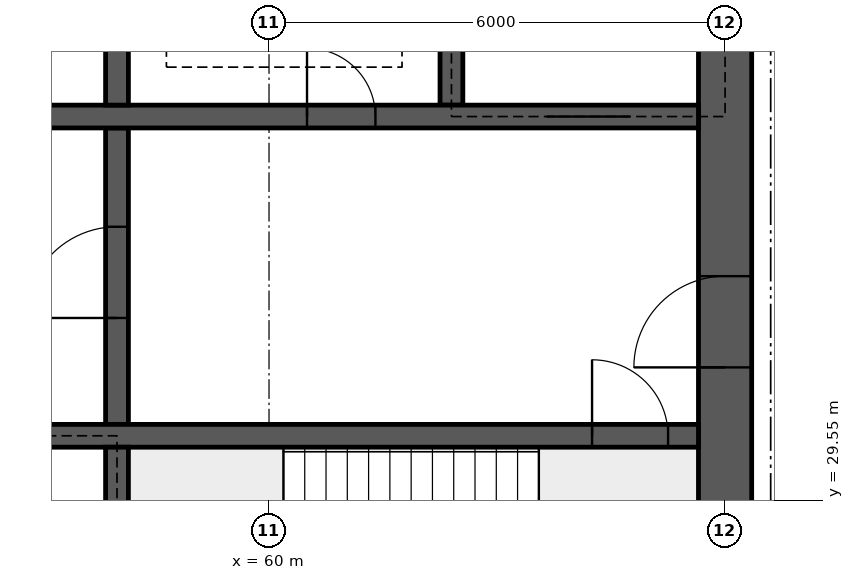
"""IFC4 building model, lengths in metres.
Left out: names, types, materials, properties, quantities, classifications, styles, units other than length and angle.
Written with IfcOpenShell. Run it as: python <this file> out.ifc"""

import sys

from ifc_helpers import new_model, si_unit, direction, frame, frame_2d, origin, place, context, subcontext, project, spatial, rectangle, extrude, element, fill, save


model = new_model("IFC4")
c1 = context("Model", 3, precision=1e-05, world=origin(), true_north=direction((0.0, 1.0)))
c2 = subcontext(c1, "Body", "Model", "MODEL_VIEW")
j1 = project(units=[si_unit("LENGTHUNIT", "METRE"), si_unit("PLANEANGLEUNIT", "RADIAN")], contexts=[c1])
p1 = place(None, origin())
s1 = spatial("IfcSite", under=j1, at=p1, CompositionType="ELEMENT")
p2 = place(p1, origin())
s2 = spatial("IfcBuilding", under=s1, at=p2, CompositionType="ELEMENT")
p3 = place(p2, frame((0.0, 0.0, 257.8)))
s3 = spatial("IfcBuildingStorey", under=s2, at=p3, CompositionType="ELEMENT", Elevation=257.8)
p4 = place(p3, frame((66.0, 26.15, 0.0), z_axis=(0.0, 0.0, 1.0), x_axis=(0.0, 1.0, 0.0)))
e1 = element("IfcWall", 1, at=p4, inside=s3, PredefinedType="SHEAR", context=c2, shape_type="SweptSolid", body=[
    extrude(rectangle(XDim=11.7, YDim=0.7, at=frame_2d((5.85, 0.0))), origin(), (0.0, 0.0, 1.0), 4.5),
])
p5 = place(p4, frame((5.15, 0.0, 0.0)))
e2 = element("IfcOpeningElement", 2, at=p5, cuts=e1, PredefinedType="OPENING", context=c2, shape_type="SweptSolid", body=[
    extrude(rectangle(XDim=1.2, YDim=2.1, at=frame_2d((0.6, 1.05))), frame((0.0, 0.36, 0.0), z_axis=(0.0, -1.0, 0.0), x_axis=(1.0, 0.0, 0.0)), (0.0, 0.0, 1.0), 0.72),
])
p6 = place(p3, frame((18.35, 30.4, 0.0), z_axis=(0.0, 0.0, 1.0), x_axis=(1.0, 0.0, 0.0)))
e3 = element("IfcWall", 3, at=p6, inside=s3, PredefinedType="SHEAR", context=c2, shape_type="SweptSolid", body=[
    extrude(rectangle(XDim=47.3, YDim=0.3, at=frame_2d((23.65, 0.0))), origin(), (0.0, 0.0, 1.0), 4.5),
])
p7 = place(p6, frame((0.4, 0.0, 0.0)))
e4 = element("IfcOpeningElement", 4, at=p7, cuts=e3, PredefinedType="OPENING", context=c2, shape_type="SweptSolid", body=[
    extrude(rectangle(XDim=1.0, YDim=2.1, at=frame_2d((0.5, 1.05))), frame((0.0, 0.16, 0.0), z_axis=(0.0, -1.0, 0.0), x_axis=(1.0, 0.0, 0.0)), (0.0, 0.0, 1.0), 0.32),
])
p8 = place(p6, frame((45.9, 0.0, 0.0)))
e5 = element("IfcOpeningElement", 5, at=p8, cuts=e3, PredefinedType="OPENING", context=c2, shape_type="SweptSolid", body=[
    extrude(rectangle(XDim=1.0, YDim=2.1, at=frame_2d((0.5, 1.05))), frame((0.0, 0.16, 0.0), z_axis=(0.0, -1.0, 0.0), x_axis=(1.0, 0.0, 0.0)), (0.0, 0.0, 1.0), 0.32),
])
p9 = place(p6, frame((8.4, 0.0, 0.0)))
e6 = element("IfcOpeningElement", 6, at=p9, cuts=e3, PredefinedType="OPENING", context=c2, shape_type="SweptSolid", body=[
    extrude(rectangle(XDim=1.1, YDim=2.1, at=frame_2d((0.55, 1.05))), frame((0.0, 0.16, 0.0), z_axis=(0.0, -1.0, 0.0), x_axis=(1.0, 0.0, 0.0)), (0.0, 0.0, 1.0), 0.32),
])
p10 = place(p6, frame((11.0, 0.0, 0.0)))
e7 = element("IfcOpeningElement", 7, at=p10, cuts=e3, PredefinedType="OPENING", context=c2, shape_type="SweptSolid", body=[
    extrude(rectangle(XDim=1.1, YDim=2.1, at=frame_2d((0.55, 1.05))), frame((0.0, 0.16, 0.0), z_axis=(0.0, -1.0, 0.0), x_axis=(1.0, 0.0, 0.0)), (0.0, 0.0, 1.0), 0.32),
])
p11 = place(p6, frame((13.6, 0.0, 0.0)))
e8 = element("IfcOpeningElement", 8, at=p11, cuts=e3, PredefinedType="OPENING", context=c2, shape_type="SweptSolid", body=[
    extrude(rectangle(XDim=1.1, YDim=2.1, at=frame_2d((0.55, 1.05))), frame((0.0, 0.16, 0.0), z_axis=(0.0, -1.0, 0.0), x_axis=(1.0, 0.0, 0.0)), (0.0, 0.0, 1.0), 0.32),
])
p12 = place(p6, frame((16.2, 0.0, 0.0)))
e9 = element("IfcOpeningElement", 9, at=p12, cuts=e3, PredefinedType="OPENING", context=c2, shape_type="SweptSolid", body=[
    extrude(rectangle(XDim=1.1, YDim=2.1, at=frame_2d((0.55, 1.05))), frame((0.0, 0.16, 0.0), z_axis=(0.0, -1.0, 0.0), x_axis=(1.0, 0.0, 0.0)), (0.0, 0.0, 1.0), 0.32),
])
p13 = place(p6, frame((18.975, 0.0, 0.0)))
e10 = element("IfcOpeningElement", 10, at=p13, cuts=e3, PredefinedType="OPENING", context=c2, shape_type="SweptSolid", body=[
    extrude(rectangle(XDim=0.9, YDim=2.1, at=frame_2d((0.45, 1.05))), frame((0.0, 0.16, 0.0), z_axis=(0.0, -1.0, 0.0), x_axis=(1.0, 0.0, 0.0)), (0.0, 0.0, 1.0), 0.32),
])
p14 = place(p6, frame((24.475, 0.0, 0.0)))
e11 = element("IfcOpeningElement", 11, at=p14, cuts=e3, PredefinedType="OPENING", context=c2, shape_type="SweptSolid", body=[
    extrude(rectangle(XDim=0.9, YDim=2.1, at=frame_2d((0.45, 1.05))), frame((0.0, 0.16, 0.0), z_axis=(0.0, -1.0, 0.0), x_axis=(1.0, 0.0, 0.0)), (0.0, 0.0, 1.0), 0.32),
])
p15 = place(p6, frame((30.267, 0.0, 0.0)))
e12 = element("IfcOpeningElement", 12, at=p15, cuts=e3, PredefinedType="OPENING", context=c2, shape_type="SweptSolid", body=[
    extrude(rectangle(XDim=1.1, YDim=2.1, at=frame_2d((0.55, 1.05))), frame((0.0, 0.16, 0.0), z_axis=(0.0, -1.0, 0.0), x_axis=(1.0, 0.0, 0.0)), (0.0, 0.0, 1.0), 0.32),
])
p16 = place(p6, frame((33.8, 0.0, 0.0)))
e13 = element("IfcOpeningElement", 13, at=p16, cuts=e3, PredefinedType="OPENING", context=c2, shape_type="SweptSolid", body=[
    extrude(rectangle(XDim=1.1, YDim=2.1, at=frame_2d((0.55, 1.05))), frame((0.0, 0.16, 0.0), z_axis=(0.0, -1.0, 0.0), x_axis=(1.0, 0.0, 0.0)), (0.0, 0.0, 1.0), 0.32),
])
p17 = place(p6, frame((37.333, 0.0, 0.0)))
e14 = element("IfcOpeningElement", 14, at=p17, cuts=e3, PredefinedType="OPENING", context=c2, shape_type="SweptSolid", body=[
    extrude(rectangle(XDim=1.1, YDim=2.1, at=frame_2d((0.55, 1.05))), frame((0.0, 0.16, 0.0), z_axis=(0.0, -1.0, 0.0), x_axis=(1.0, 0.0, 0.0)), (0.0, 0.0, 1.0), 0.32),
])
p18 = place(p3, frame((18.35, 34.6, 0.0), z_axis=(0.0, 0.0, 1.0), x_axis=(1.0, 0.0, 0.0)))
e15 = element("IfcWall", 15, at=p18, inside=s3, PredefinedType="SHEAR", context=c2, shape_type="SweptSolid", body=[
    extrude(rectangle(XDim=47.3, YDim=0.3, at=frame_2d((23.65, 0.0))), origin(), (0.0, 0.0, 1.0), 4.5),
])
p19 = place(p18, frame((0.9, 0.0, 0.0)))
e16 = element("IfcOpeningElement", 16, at=p19, cuts=e15, PredefinedType="OPENING", context=c2, shape_type="SweptSolid", body=[
    extrude(rectangle(XDim=1.1, YDim=2.1, at=frame_2d((0.55, 1.05))), frame((0.0, 0.16, 0.0), z_axis=(0.0, -1.0, 0.0), x_axis=(1.0, 0.0, 0.0)), (0.0, 0.0, 1.0), 0.32),
])
p20 = place(p18, frame((45.3, 0.0, 0.0)))
e17 = element("IfcOpeningElement", 17, at=p20, cuts=e15, PredefinedType="OPENING", context=c2, shape_type="SweptSolid", body=[
    extrude(rectangle(XDim=1.1, YDim=2.1, at=frame_2d((0.55, 1.05))), frame((0.0, 0.16, 0.0), z_axis=(0.0, -1.0, 0.0), x_axis=(1.0, 0.0, 0.0)), (0.0, 0.0, 1.0), 0.32),
])
p21 = place(p18, frame((4.25, 0.0, 0.0)))
e18 = element("IfcOpeningElement", 18, at=p21, cuts=e15, PredefinedType="OPENING", context=c2, shape_type="SweptSolid", body=[
    extrude(rectangle(XDim=0.9, YDim=2.1, at=frame_2d((0.45, 1.05))), frame((0.0, 0.16, 0.0), z_axis=(0.0, -1.0, 0.0), x_axis=(1.0, 0.0, 0.0)), (0.0, 0.0, 1.0), 0.32),
])
p22 = place(p18, frame((42.15, 0.0, 0.0)))
e19 = element("IfcOpeningElement", 19, at=p22, cuts=e15, PredefinedType="OPENING", context=c2, shape_type="SweptSolid", body=[
    extrude(rectangle(XDim=0.9, YDim=2.1, at=frame_2d((0.45, 1.05))), frame((0.0, 0.16, 0.0), z_axis=(0.0, -1.0, 0.0), x_axis=(1.0, 0.0, 0.0)), (0.0, 0.0, 1.0), 0.32),
])
p23 = place(p18, frame((9.025, 0.0, 0.0)))
e20 = element("IfcOpeningElement", 20, at=p23, cuts=e15, PredefinedType="OPENING", context=c2, shape_type="SweptSolid", body=[
    extrude(rectangle(XDim=0.9, YDim=2.1, at=frame_2d((0.45, 1.05))), frame((0.0, 0.16, 0.0), z_axis=(0.0, -1.0, 0.0), x_axis=(1.0, 0.0, 0.0)), (0.0, 0.0, 1.0), 0.32),
])
p24 = place(p18, frame((12.999, 0.0, 0.0)))
e21 = element("IfcOpeningElement", 21, at=p24, cuts=e15, PredefinedType="OPENING", context=c2, shape_type="SweptSolid", body=[
    extrude(rectangle(XDim=0.9, YDim=2.1, at=frame_2d((0.45, 1.05))), frame((0.0, 0.16, 0.0), z_axis=(0.0, -1.0, 0.0), x_axis=(1.0, 0.0, 0.0)), (0.0, 0.0, 1.0), 0.32),
])
p25 = place(p18, frame((16.646, 0.0, 0.0)))
e22 = element("IfcOpeningElement", 22, at=p25, cuts=e15, PredefinedType="OPENING", context=c2, shape_type="SweptSolid", body=[
    extrude(rectangle(XDim=0.9, YDim=2.1, at=frame_2d((0.45, 1.05))), frame((0.0, 0.16, 0.0), z_axis=(0.0, -1.0, 0.0), x_axis=(1.0, 0.0, 0.0)), (0.0, 0.0, 1.0), 0.32),
])
p26 = place(p18, frame((20.405, 0.0, 0.0)))
e23 = element("IfcOpeningElement", 23, at=p26, cuts=e15, PredefinedType="OPENING", context=c2, shape_type="SweptSolid", body=[
    extrude(rectangle(XDim=0.9, YDim=2.1, at=frame_2d((0.45, 1.05))), frame((0.0, 0.16, 0.0), z_axis=(0.0, -1.0, 0.0), x_axis=(1.0, 0.0, 0.0)), (0.0, 0.0, 1.0), 0.32),
])
p27 = place(p18, frame((24.811, 0.0, 0.0)))
e24 = element("IfcOpeningElement", 24, at=p27, cuts=e15, PredefinedType="OPENING", context=c2, shape_type="SweptSolid", body=[
    extrude(rectangle(XDim=0.9, YDim=2.1, at=frame_2d((0.45, 1.05))), frame((0.0, 0.16, 0.0), z_axis=(0.0, -1.0, 0.0), x_axis=(1.0, 0.0, 0.0)), (0.0, 0.0, 1.0), 0.32),
])
p28 = place(p18, frame((27.608, 0.0, 0.0)))
e25 = element("IfcOpeningElement", 25, at=p28, cuts=e15, PredefinedType="OPENING", context=c2, shape_type="SweptSolid", body=[
    extrude(rectangle(XDim=0.9, YDim=2.1, at=frame_2d((0.45, 1.05))), frame((0.0, 0.16, 0.0), z_axis=(0.0, -1.0, 0.0), x_axis=(1.0, 0.0, 0.0)), (0.0, 0.0, 1.0), 0.32),
])
p29 = place(p18, frame((29.981, 0.0, 0.0)))
e26 = element("IfcOpeningElement", 26, at=p29, cuts=e15, PredefinedType="OPENING", context=c2, shape_type="SweptSolid", body=[
    extrude(rectangle(XDim=0.9, YDim=2.1, at=frame_2d((0.45, 1.05))), frame((0.0, 0.16, 0.0), z_axis=(0.0, -1.0, 0.0), x_axis=(1.0, 0.0, 0.0)), (0.0, 0.0, 1.0), 0.32),
])
p30 = place(p18, frame((33.831, 0.0, 0.0)))
e27 = element("IfcOpeningElement", 27, at=p30, cuts=e15, PredefinedType="OPENING", context=c2, shape_type="SweptSolid", body=[
    extrude(rectangle(XDim=0.9, YDim=2.1, at=frame_2d((0.45, 1.05))), frame((0.0, 0.16, 0.0), z_axis=(0.0, -1.0, 0.0), x_axis=(1.0, 0.0, 0.0)), (0.0, 0.0, 1.0), 0.32),
])
p31 = place(p18, frame((37.579, 0.0, 0.0)))
e28 = element("IfcOpeningElement", 28, at=p31, cuts=e15, PredefinedType="OPENING", context=c2, shape_type="SweptSolid", body=[
    extrude(rectangle(XDim=0.9, YDim=2.1, at=frame_2d((0.45, 1.05))), frame((0.0, 0.16, 0.0), z_axis=(0.0, -1.0, 0.0), x_axis=(1.0, 0.0, 0.0)), (0.0, 0.0, 1.0), 0.32),
])
p32 = place(p3, frame((58.0, 26.15, 0.0), z_axis=(0.0, 0.0, 1.0), x_axis=(0.0, 1.0, 0.0)))
e29 = element("IfcWall", 29, at=p32, inside=s3, PredefinedType="SHEAR", context=c2, shape_type="SweptSolid", body=[
    extrude(rectangle(XDim=4.1, YDim=0.3, at=frame_2d((2.05, 0.0))), origin(), (0.0, 0.0, 1.0), 4.5),
])
p33 = place(p3, frame((58.0, 30.55, 0.0), z_axis=(0.0, 0.0, 1.0), x_axis=(0.0, 1.0, 0.0)))
e30 = element("IfcWall", 30, at=p33, inside=s3, PredefinedType="SHEAR", context=c2, shape_type="SweptSolid", body=[
    extrude(rectangle(XDim=3.9, YDim=0.3, at=frame_2d((1.95, 0.0))), origin(), (0.0, 0.0, 1.0), 4.5),
])
p34 = place(p33, frame((1.4, 0.0, 0.0)))
e31 = element("IfcOpeningElement", 31, at=p34, cuts=e30, PredefinedType="OPENING", context=c2, shape_type="SweptSolid", body=[
    extrude(rectangle(XDim=1.2, YDim=2.1, at=frame_2d((0.6, 1.05))), frame((0.0, 0.16, 0.0), z_axis=(0.0, -1.0, 0.0), x_axis=(1.0, 0.0, 0.0)), (0.0, 0.0, 1.0), 0.32),
])
for number, where, z_axis, x_axis in (
    (32, (62.4, 34.75, 0.0), (0.0, 0.0, 1.0), (0.0, 1.0, 0.0)),
    (33, (58.0, 34.75, 0.0), (0.0, 0.0, 1.0), (0.0, 1.0, 0.0)),
):
    element("IfcWall", number, at=place(p3, frame(where, z_axis=z_axis, x_axis=x_axis)), inside=s3, PredefinedType="SHEAR", context=c2, shape_type="SweptSolid", body=[
        extrude(rectangle(XDim=3.1, YDim=0.3, at=frame_2d((1.55, 0.0))), origin(), (0.0, 0.0, 1.0), 4.5),
    ])
p35 = place(p5, origin())
e34 = element("IfcDoor", 34, at=p35, inside=s3, OperationType="SINGLE_SWING_LEFT", PredefinedType="DOOR", context=c2, shape_type="SweptSolid", body=[
    extrude(rectangle(XDim=1.2, YDim=2.1, at=frame_2d((0.6, 1.05))), frame((0.0, 0.025, 0.0), z_axis=(0.0, -1.0, 0.0), x_axis=(1.0, 0.0, 0.0)), (0.0, 0.0, 1.0), 0.05),
])
fill(e2, e34)
p36 = place(p8, origin())
e35 = element("IfcDoor", 35, at=p36, inside=s3, OperationType="SINGLE_SWING_LEFT", PredefinedType="DOOR", context=c2, shape_type="SweptSolid", body=[
    extrude(rectangle(XDim=1.0, YDim=2.1, at=frame_2d((0.5, 1.05))), frame((0.0, 0.025, 0.0), z_axis=(0.0, -1.0, 0.0), x_axis=(1.0, 0.0, 0.0)), (0.0, 0.0, 1.0), 0.05),
])
fill(e5, e35)
p37 = place(p20, origin())
e36 = element("IfcDoor", 36, at=p37, inside=s3, OperationType="DOUBLE_DOOR_SLIDING", PredefinedType="DOOR", context=c2, shape_type="SweptSolid", body=[
    extrude(rectangle(XDim=1.1, YDim=2.1, at=frame_2d((0.55, 1.05))), frame((0.0, 0.025, 0.0), z_axis=(0.0, -1.0, 0.0), x_axis=(1.0, 0.0, 0.0)), (0.0, 0.0, 1.0), 0.05),
])
fill(e17, e36)
p38 = place(p22, origin())
e37 = element("IfcDoor", 37, at=p38, inside=s3, OperationType="SINGLE_SWING_LEFT", PredefinedType="DOOR", context=c2, shape_type="SweptSolid", body=[
    extrude(rectangle(XDim=0.9, YDim=2.1, at=frame_2d((0.45, 1.05))), frame((0.0, 0.025, 0.0), z_axis=(0.0, -1.0, 0.0), x_axis=(1.0, 0.0, 0.0)), (0.0, 0.0, 1.0), 0.05),
])
fill(e19, e37)
p39 = place(p34, origin())
e38 = element("IfcDoor", 38, at=p39, inside=s3, OperationType="SINGLE_SWING_LEFT", PredefinedType="DOOR", context=c2, shape_type="SweptSolid", body=[
    extrude(rectangle(XDim=1.2, YDim=2.1, at=frame_2d((0.6, 1.05))), frame((0.0, 0.025, 0.0), z_axis=(0.0, -1.0, 0.0), x_axis=(1.0, 0.0, 0.0)), (0.0, 0.0, 1.0), 0.05),
])
fill(e31, e38)
save(model, sys.argv[1])
